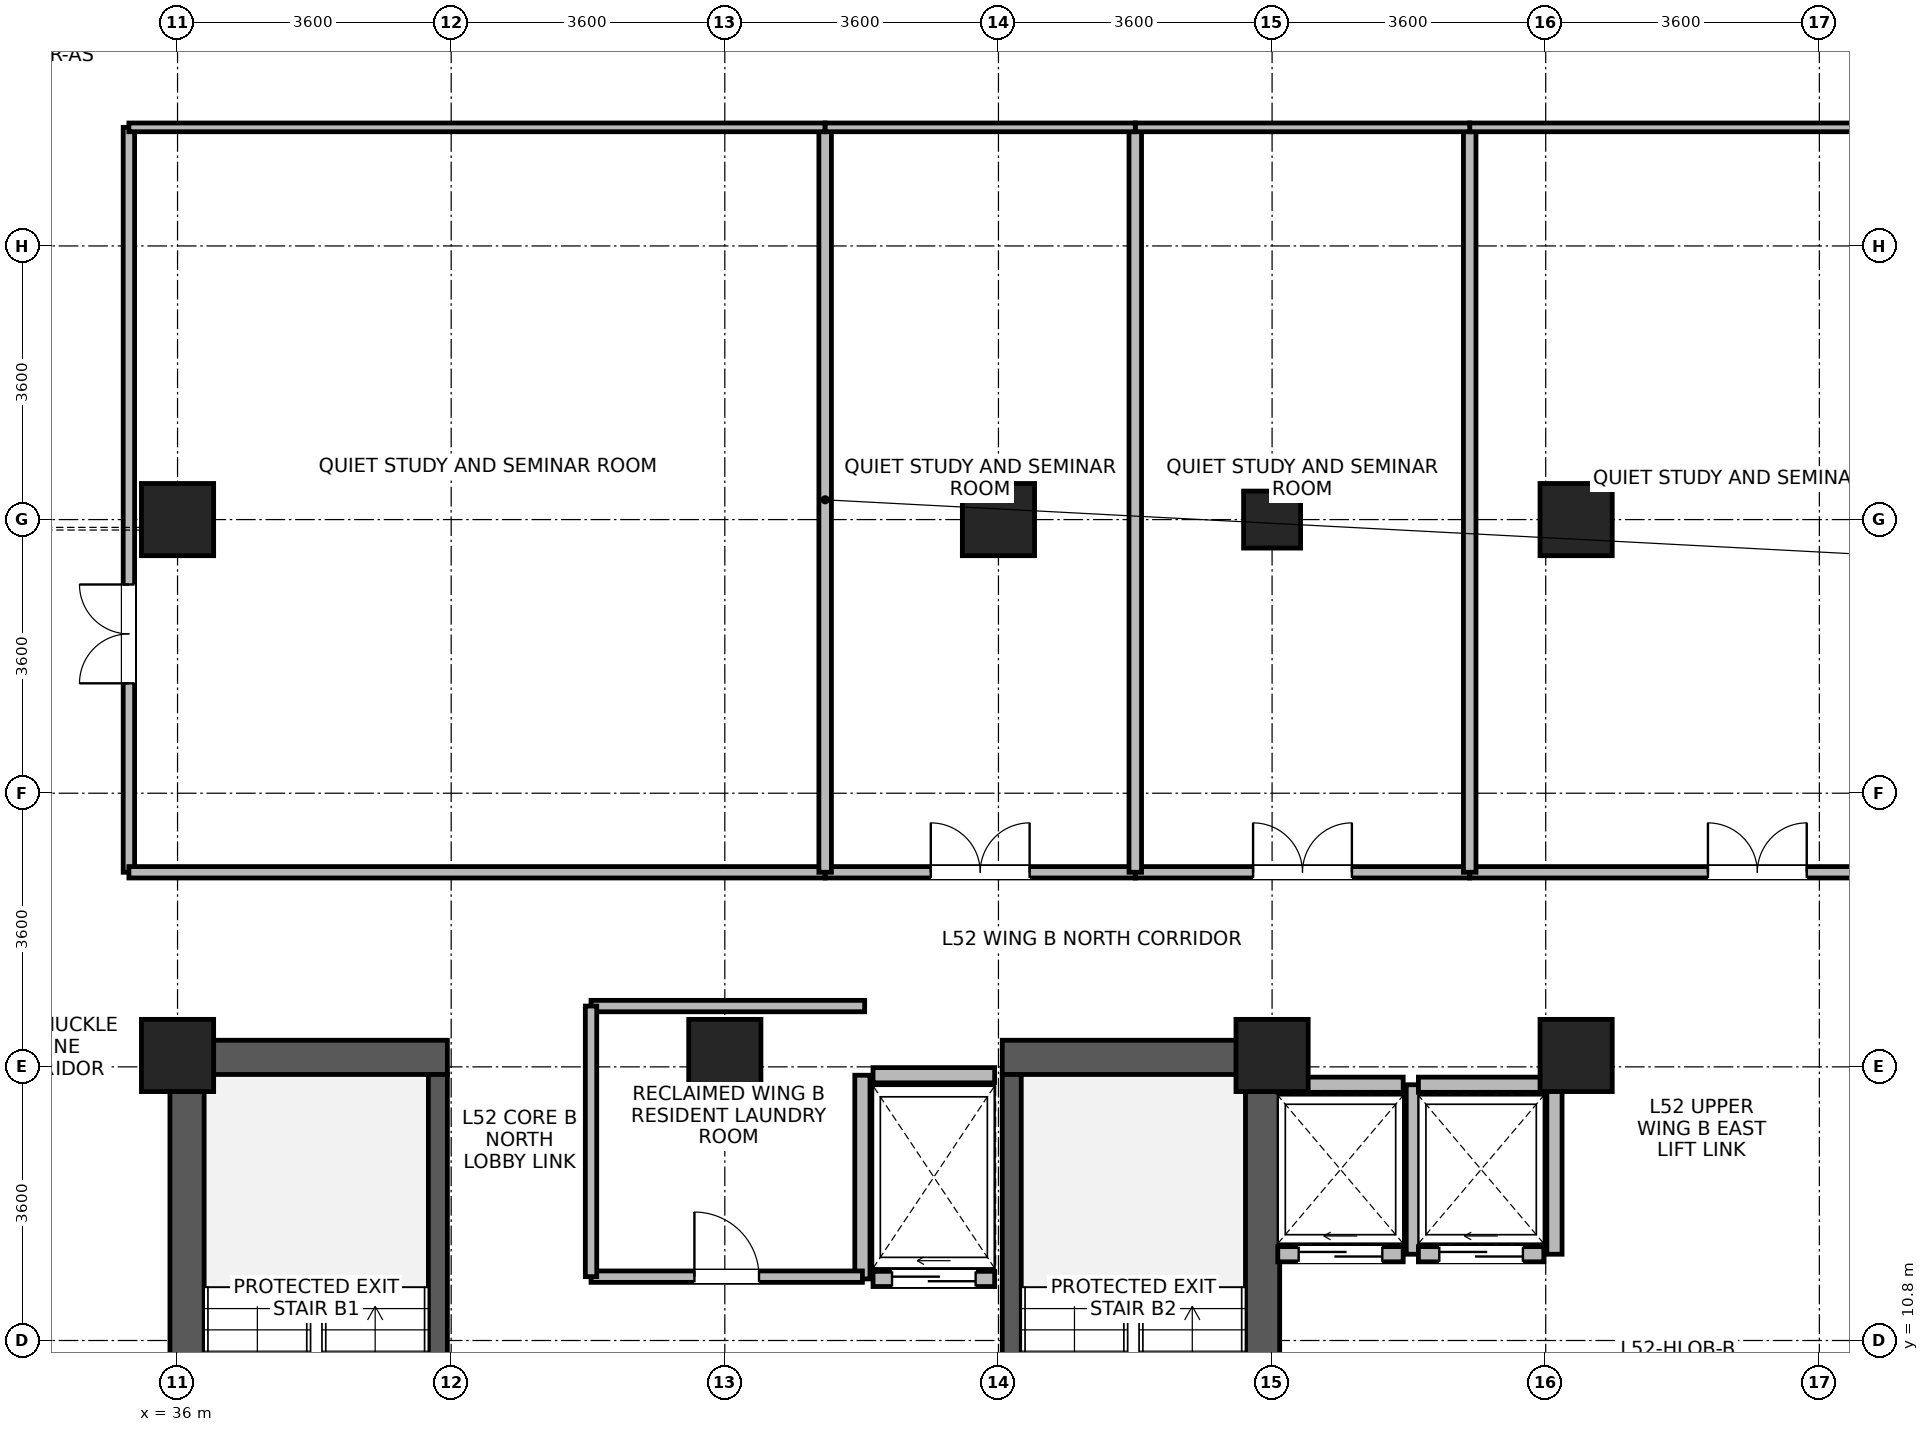
"""IFC4 building model, lengths in metres.
Left out: names, types, materials, properties, quantities, classifications, styles, units other than length and angle.
Written with IfcOpenShell. Run it as: python <this file> out.ifc"""

import sys

from ifc_helpers import new_model, si_unit, direction, frame, frame_2d, origin, origin_2d, place, context, subcontext, project, spatial, rectangle, extrude, source, transform, mapped, element, fill, save


model = new_model("IFC4")
c1 = context("Model", 3, precision=1e-05, world=origin(), true_north=direction((0.0, 1.0)))
c2 = subcontext(c1, "Body", "Model", "MODEL_VIEW")
j1 = project(units=[si_unit("LENGTHUNIT", "METRE"), si_unit("PLANEANGLEUNIT", "RADIAN")], contexts=[c1])
p1 = place(None, origin())
s1 = spatial("IfcSite", under=j1, at=p1, CompositionType="ELEMENT")
p2 = place(p1, origin())
s2 = spatial("IfcBuilding", under=s1, at=p2, CompositionType="ELEMENT")
p3 = place(p2, frame((0.0, 0.0, 205.5)))
s3 = spatial("IfcBuildingStorey", under=s2, at=p3, CompositionType="ELEMENT", Elevation=205.5)
for number, where, z_axis, x_axis in (
    (1, (36.125, 6.85, 0.0), (0.0, 0.0, 1.0), (0.0, 1.0, 0.0)),
    (2, (50.275, 6.85, 0.0), (0.0, 0.0, 1.0), (0.0, 1.0, 0.0)),
):
    element("IfcWall", number, at=place(p3, frame(where, z_axis=z_axis, x_axis=x_axis)), inside=s3, PredefinedType="SHEAR", context=c2, shape_type="SweptSolid", body=[
        extrude(rectangle(XDim=7.9, YDim=0.45, at=frame_2d((3.95, 0.0))), origin(), (0.0, 0.0, 1.0), 3.47),
    ])
for number, where, z_axis, x_axis in (
    (3, (36.35, 14.525, 0.0), (0.0, 0.0, 1.0), (1.0, 0.0, 0.0)),
    (4, (46.85, 14.525, 0.0), (0.0, 0.0, 1.0), (1.0, 0.0, 0.0)),
):
    element("IfcWall", number, at=place(p3, frame(where, z_axis=z_axis, x_axis=x_axis)), inside=s3, PredefinedType="SHEAR", context=c2, shape_type="SweptSolid", body=[
        extrude(rectangle(XDim=3.2, YDim=0.45, at=frame_2d((1.6, 0.0))), origin(), (0.0, 0.0, 1.0), 3.47),
    ])
p4 = place(p3, frame((39.425, 7.3, 0.0), z_axis=(0.0, 0.0, 1.0), x_axis=(0.0, 1.0, 0.0)))
e5 = element("IfcWall", 5, at=p4, inside=s3, PredefinedType="SHEAR", context=c2, shape_type="SweptSolid", body=[
    extrude(rectangle(XDim=7.0, YDim=0.25, at=frame_2d((3.5, 0.0))), origin(), (0.0, 0.0, 1.0), 3.47),
])
p5 = place(p4, frame((0.15, 0.0, 0.0)))
e6 = element("IfcOpeningElement", 6, at=p5, cuts=e5, PredefinedType="OPENING", context=c2, shape_type="SweptSolid", body=[
    extrude(rectangle(XDim=1.1, YDim=2.08, at=frame_2d((0.55, 1.04))), frame((0.0, 0.135, 0.0), z_axis=(0.0, -1.0, 0.0), x_axis=(1.0, 0.0, 0.0)), (0.0, 0.0, 1.0), 0.27),
])
p6 = place(p3, frame((46.975, 7.3, 0.0), z_axis=(0.0, 0.0, 1.0), x_axis=(0.0, 1.0, 0.0)))
e7 = element("IfcWall", 7, at=p6, inside=s3, PredefinedType="SHEAR", context=c2, shape_type="SweptSolid", body=[
    extrude(rectangle(XDim=7.0, YDim=0.25, at=frame_2d((3.5, 0.0))), origin(), (0.0, 0.0, 1.0), 3.47),
])
p7 = place(p6, frame((0.15, 0.0, 0.0)))
e8 = element("IfcOpeningElement", 8, at=p7, cuts=e7, PredefinedType="OPENING", context=c2, shape_type="SweptSolid", body=[
    extrude(rectangle(XDim=1.1, YDim=2.08, at=frame_2d((0.55, 1.04))), frame((0.0, 0.135, 0.0), z_axis=(0.0, -1.0, 0.0), x_axis=(1.0, 0.0, 0.0)), (0.0, 0.0, 1.0), 0.27),
])
m1 = source(origin(), c2, "Body", "SweptSolid", [
    extrude(rectangle(XDim=0.95, YDim=0.95, at=origin_2d()), origin(), (0.0, 0.0, 1.0), 3.7),
])
for number, where, z_axis, x_axis in (
    (9, (36.0, 21.6, 0.0), (0.0, 0.0, 1.0), (1.0, 0.0, 0.0)),
    (10, (46.8, 21.6, 0.0), (0.0, 0.0, 1.0), (1.0, 0.0, 0.0)),
    (11, (36.0, 14.55, 0.0), (0.0, 0.0, 1.0), (1.0, 0.0, 0.0)),
    (12, (43.2, 14.55, 0.0), (0.0, 0.0, 1.0), (1.0, 0.0, 0.0)),
    (13, (50.4, 14.55, 0.0), (0.0, 0.0, 1.0), (1.0, 0.0, 0.0)),
):
    element("IfcColumn", number, at=place(p3, frame(where, z_axis=z_axis, x_axis=x_axis)), inside=s3, PredefinedType="COLUMN", context=c2, shape_type="MappedRepresentation", body=[
        mapped(m1, transform((0.0, 0.0, 0.0), x_axis=(1.0, 0.0, 0.0), y_axis=(0.0, 1.0, 0.0), z_axis=(0.0, 0.0, 1.0), scale=1.0)),
    ])
m2 = source(origin(), c2, "Body", "SweptSolid", [
    extrude(rectangle(XDim=0.75, YDim=0.75, at=origin_2d()), origin(), (0.0, 0.0, 1.0), 3.7),
])
p8 = place(p3, frame((50.4, 21.6, 0.0), z_axis=(0.0, 0.0, 1.0), x_axis=(1.0, 0.0, 0.0)))
e14 = element("IfcColumn", 14, at=p8, inside=s3, PredefinedType="PILASTER", context=c2, shape_type="MappedRepresentation", body=[
    mapped(m2, transform((0.0, 0.0, 0.0), x_axis=(1.0, 0.0, 0.0), y_axis=(0.0, 1.0, 0.0), z_axis=(0.0, 0.0, 1.0), scale=1.0)),
])
for number, where, z_axis, x_axis in (
    (15, (54.4, 14.55, 0.0), (0.0, 0.0, 1.0), (1.0, 0.0, 0.0)),
    (16, (54.4, 21.6, 0.0), (0.0, 0.0, 1.0), (1.0, 0.0, 0.0)),
):
    element("IfcColumn", number, at=place(p3, frame(where, z_axis=z_axis, x_axis=x_axis)), inside=s3, PredefinedType="COLUMN", context=c2, shape_type="MappedRepresentation", body=[
        mapped(m1, transform((0.0, 0.0, 0.0), x_axis=(1.0, 0.0, 0.0), y_axis=(0.0, 1.0, 0.0), z_axis=(0.0, 0.0, 1.0), scale=1.0)),
    ])
p9 = place(p3, frame((50.475, 11.935, 0.0), z_axis=(0.0, 0.0, 1.0), x_axis=(1.0, 0.0, 0.0)))
e17 = element("IfcWall", 17, at=p9, inside=s3, PredefinedType="PARTITIONING", context=c2, shape_type="SweptSolid", body=[
    extrude(rectangle(XDim=1.65, YDim=0.2, at=frame_2d((0.825, 0.0))), origin(), (0.0, 0.0, 1.0), 3.45),
])
p10 = place(p9, frame((0.275, 0.0, 0.0)))
e18 = element("IfcOpeningElement", 18, at=p10, cuts=e17, PredefinedType="OPENING", context=c2, shape_type="SweptSolid", body=[
    extrude(rectangle(XDim=1.1, YDim=2.12, at=frame_2d((0.55, 1.06))), frame((0.0, 0.11, 0.0), z_axis=(0.0, -1.0, 0.0), x_axis=(1.0, 0.0, 0.0)), (0.0, 0.0, 1.0), 0.22),
])
p11 = place(p3, frame((50.475, 14.165, 0.0), z_axis=(0.0, 0.0, 1.0), x_axis=(1.0, 0.0, 0.0)))
e19 = element("IfcWall", 19, at=p11, inside=s3, PredefinedType="PARTITIONING", context=c2, shape_type="SweptSolid", body=[
    extrude(rectangle(XDim=1.65, YDim=0.2, at=frame_2d((0.825, 0.0))), origin(), (0.0, 0.0, 1.0), 3.45),
])
p12 = place(p3, frame((52.265, 11.935, 0.0), z_axis=(0.0, 0.0, 1.0), x_axis=(0.0, 1.0, 0.0)))
e20 = element("IfcWall", 20, at=p12, inside=s3, PredefinedType="PARTITIONING", context=c2, shape_type="SweptSolid", body=[
    extrude(rectangle(XDim=2.23, YDim=0.2, at=frame_2d((1.115, 0.0))), origin(), (0.0, 0.0, 1.0), 3.45),
])
p13 = place(p3, frame((52.325, 11.935, 0.0), z_axis=(0.0, 0.0, 1.0), x_axis=(1.0, 0.0, 0.0)))
e21 = element("IfcWall", 21, at=p13, inside=s3, PredefinedType="PARTITIONING", context=c2, shape_type="SweptSolid", body=[
    extrude(rectangle(XDim=1.65, YDim=0.2, at=frame_2d((0.825, 0.0))), origin(), (0.0, 0.0, 1.0), 3.45),
])
p14 = place(p13, frame((0.275, 0.0, 0.0)))
e22 = element("IfcOpeningElement", 22, at=p14, cuts=e21, PredefinedType="OPENING", context=c2, shape_type="SweptSolid", body=[
    extrude(rectangle(XDim=1.1, YDim=2.12, at=frame_2d((0.55, 1.06))), frame((0.0, 0.11, 0.0), z_axis=(0.0, -1.0, 0.0), x_axis=(1.0, 0.0, 0.0)), (0.0, 0.0, 1.0), 0.22),
])
p15 = place(p3, frame((52.325, 14.165, 0.0), z_axis=(0.0, 0.0, 1.0), x_axis=(1.0, 0.0, 0.0)))
e23 = element("IfcWall", 23, at=p15, inside=s3, PredefinedType="PARTITIONING", context=c2, shape_type="SweptSolid", body=[
    extrude(rectangle(XDim=1.65, YDim=0.2, at=frame_2d((0.825, 0.0))), origin(), (0.0, 0.0, 1.0), 3.45),
])
p16 = place(p3, frame((54.115, 11.935, 0.0), z_axis=(0.0, 0.0, 1.0), x_axis=(0.0, 1.0, 0.0)))
e24 = element("IfcWall", 24, at=p16, inside=s3, PredefinedType="PARTITIONING", context=c2, shape_type="SweptSolid", body=[
    extrude(rectangle(XDim=2.23, YDim=0.2, at=frame_2d((1.115, 0.0))), origin(), (0.0, 0.0, 1.0), 3.45),
])
p17 = place(p3, frame((45.15, 11.61, 0.0), z_axis=(0.0, 0.0, 1.0), x_axis=(1.0, 0.0, 0.0)))
e25 = element("IfcWall", 25, at=p17, inside=s3, PredefinedType="PARTITIONING", context=c2, shape_type="SweptSolid", body=[
    extrude(rectangle(XDim=1.6, YDim=0.2, at=frame_2d((0.8, 0.0))), origin(), (0.0, 0.0, 1.0), 3.45),
])
p18 = place(p17, frame((0.25, 0.0, 0.0)))
e26 = element("IfcOpeningElement", 26, at=p18, cuts=e25, PredefinedType="OPENING", context=c2, shape_type="SweptSolid", body=[
    extrude(rectangle(XDim=1.1, YDim=2.12, at=frame_2d((0.55, 1.06))), frame((0.0, 0.11, 0.0), z_axis=(0.0, -1.0, 0.0), x_axis=(1.0, 0.0, 0.0)), (0.0, 0.0, 1.0), 0.22),
])
p19 = place(p3, frame((45.15, 14.29, 0.0), z_axis=(0.0, 0.0, 1.0), x_axis=(1.0, 0.0, 0.0)))
e27 = element("IfcWall", 27, at=p19, inside=s3, PredefinedType="PARTITIONING", context=c2, shape_type="SweptSolid", body=[
    extrude(rectangle(XDim=1.6, YDim=0.2, at=frame_2d((0.8, 0.0))), origin(), (0.0, 0.0, 1.0), 2.45),
])
p20 = place(p3, frame((45.01, 11.61, 0.0), z_axis=(0.0, 0.0, 1.0), x_axis=(0.0, 1.0, 0.0)))
e28 = element("IfcWall", 28, at=p20, inside=s3, PredefinedType="PARTITIONING", context=c2, shape_type="SweptSolid", body=[
    extrude(rectangle(XDim=2.68, YDim=0.2, at=frame_2d((1.34, 0.0))), origin(), (0.0, 0.0, 1.0), 3.45),
])
p21 = place(p3, frame((35.36, 16.96, 0.0), z_axis=(0.0, 0.0, 1.0), x_axis=(0.0, 1.0, 0.0)))
e29 = element("IfcWall", 29, at=p21, inside=s3, PredefinedType="PARTITIONING", context=c2, shape_type="SweptSolid", body=[
    extrude(rectangle(XDim=9.8, YDim=0.15, at=frame_2d((4.9, 0.0))), origin(), (0.0, 0.0, 1.0), 3.45),
])
p22 = place(p21, frame((2.486, 0.0, 0.0)))
e30 = element("IfcOpeningElement", 30, at=p22, cuts=e29, PredefinedType="OPENING", context=c2, shape_type="SweptSolid", body=[
    extrude(rectangle(XDim=1.3, YDim=2.12, at=frame_2d((0.65, 1.06))), frame((0.0, 0.085, 0.0), z_axis=(0.0, -1.0, 0.0), x_axis=(1.0, 0.0, 0.0)), (0.0, 0.0, 1.0), 0.17),
])
p23 = place(p3, frame((35.36, 16.96, 0.0), z_axis=(0.0, 0.0, 1.0), x_axis=(1.0, 0.0, 0.0)))
e31 = element("IfcWall", 31, at=p23, inside=s3, PredefinedType="PARTITIONING", context=c2, shape_type="SweptSolid", body=[
    extrude(rectangle(XDim=9.16, YDim=0.15, at=frame_2d((4.58, 0.0))), origin(), (0.0, 0.0, 1.0), 3.45),
])
p24 = place(p3, frame((53.0, 16.96, 0.0), z_axis=(0.0, 0.0, 1.0), x_axis=(1.0, 0.0, 0.0)))
e32 = element("IfcWall", 32, at=p24, inside=s3, PredefinedType="PARTITIONING", context=c2, shape_type="SweptSolid", body=[
    extrude(rectangle(XDim=7.568, YDim=0.15, at=frame_2d((3.784, 0.0))), origin(), (0.0, 0.0, 1.0), 3.45),
])
p25 = place(p24, frame((3.134, 0.0, 0.0)))
e33 = element("IfcOpeningElement", 33, at=p25, cuts=e32, PredefinedType="OPENING", context=c2, shape_type="SweptSolid", body=[
    extrude(rectangle(XDim=1.3, YDim=2.12, at=frame_2d((0.65, 1.06))), frame((0.0, 0.085, 0.0), z_axis=(0.0, -1.0, 0.0), x_axis=(1.0, 0.0, 0.0)), (0.0, 0.0, 1.0), 0.17),
])
p26 = place(p3, frame((48.6, 16.96, 0.0), z_axis=(0.0, 0.0, 1.0), x_axis=(1.0, 0.0, 0.0)))
e34 = element("IfcWall", 34, at=p26, inside=s3, PredefinedType="PARTITIONING", context=c2, shape_type="SweptSolid", body=[
    extrude(rectangle(XDim=4.4, YDim=0.15, at=frame_2d((2.2, 0.0))), origin(), (0.0, 0.0, 1.0), 3.45),
])
p27 = place(p26, frame((1.55, 0.0, 0.0)))
e35 = element("IfcOpeningElement", 35, at=p27, cuts=e34, PredefinedType="OPENING", context=c2, shape_type="SweptSolid", body=[
    extrude(rectangle(XDim=1.3, YDim=2.12, at=frame_2d((0.65, 1.06))), frame((0.0, 0.085, 0.0), z_axis=(0.0, -1.0, 0.0), x_axis=(1.0, 0.0, 0.0)), (0.0, 0.0, 1.0), 0.17),
])
p28 = place(p3, frame((44.52, 16.96, 0.0), z_axis=(0.0, 0.0, 1.0), x_axis=(1.0, 0.0, 0.0)))
e36 = element("IfcWall", 36, at=p28, inside=s3, PredefinedType="PARTITIONING", context=c2, shape_type="SweptSolid", body=[
    extrude(rectangle(XDim=4.08, YDim=0.15, at=frame_2d((2.04, 0.0))), origin(), (0.0, 0.0, 1.0), 3.45),
])
p29 = place(p28, frame((1.39, 0.0, 0.0)))
e37 = element("IfcOpeningElement", 37, at=p29, cuts=e36, PredefinedType="OPENING", context=c2, shape_type="SweptSolid", body=[
    extrude(rectangle(XDim=1.3, YDim=2.12, at=frame_2d((0.65, 1.06))), frame((0.0, 0.085, 0.0), z_axis=(0.0, -1.0, 0.0), x_axis=(1.0, 0.0, 0.0)), (0.0, 0.0, 1.0), 0.17),
])
p30 = place(p3, frame((41.44, 11.64, 0.0), z_axis=(0.0, 0.0, 1.0), x_axis=(1.0, 0.0, 0.0)))
e38 = element("IfcWall", 38, at=p30, inside=s3, PredefinedType="PARTITIONING", context=c2, shape_type="SweptSolid", body=[
    extrude(rectangle(XDim=3.57, YDim=0.15, at=frame_2d((1.785, 0.0))), origin(), (0.0, 0.0, 1.0), 3.45),
])
p31 = place(p30, frame((1.36, 0.0, 0.0)))
e39 = element("IfcOpeningElement", 39, at=p31, cuts=e38, PredefinedType="OPENING", context=c2, shape_type="SweptSolid", body=[
    extrude(rectangle(XDim=0.85, YDim=2.04, at=frame_2d((0.425, 1.02))), frame((0.0, 0.085, 0.0), z_axis=(0.0, -1.0, 0.0), x_axis=(1.0, 0.0, 0.0)), (0.0, 0.0, 1.0), 0.17),
])
p32 = place(p3, frame((41.44, 15.2, 0.0), z_axis=(0.0, 0.0, 1.0), x_axis=(1.0, 0.0, 0.0)))
e40 = element("IfcWall", 40, at=p32, inside=s3, PredefinedType="PARTITIONING", context=c2, shape_type="SweptSolid", body=[
    extrude(rectangle(XDim=3.6, YDim=0.15, at=frame_2d((1.8, 0.0))), origin(), (0.0, 0.0, 1.0), 3.45),
])
p33 = place(p3, frame((41.44, 11.64, 0.0), z_axis=(0.0, 0.0, 1.0), x_axis=(0.0, 1.0, 0.0)))
e41 = element("IfcWall", 41, at=p33, inside=s3, PredefinedType="PARTITIONING", context=c2, shape_type="SweptSolid", body=[
    extrude(rectangle(XDim=3.56, YDim=0.15, at=frame_2d((1.78, 0.0))), origin(), (0.0, 0.0, 1.0), 3.45),
])
for number, where, z_axis, x_axis in (
    (42, (44.52, 16.96, 0.0), (0.0, 0.0, 1.0), (0.0, 1.0, 0.0)),
    (43, (48.6, 16.96, 0.0), (0.0, 0.0, 1.0), (0.0, 1.0, 0.0)),
    (44, (53.0, 16.96, 0.0), (0.0, 0.0, 1.0), (0.0, 1.0, 0.0)),
):
    element("IfcWall", number, at=place(p3, frame(where, z_axis=z_axis, x_axis=x_axis)), inside=s3, PredefinedType="PARTITIONING", context=c2, shape_type="SweptSolid", body=[
        extrude(rectangle(XDim=9.8, YDim=0.165, at=frame_2d((4.9, 0.0))), origin(), (0.0, 0.0, 1.0), 3.45),
    ])
p34 = place(p3, frame((35.36, 26.76, 0.0), z_axis=(0.0, 0.0, 1.0), x_axis=(1.0, 0.0, 0.0)))
e45 = element("IfcWall", 45, at=p34, inside=s3, PredefinedType="PARTITIONING", context=c2, shape_type="SweptSolid", body=[
    extrude(rectangle(XDim=9.16, YDim=0.115, at=frame_2d((4.58, 0.0))), origin(), (0.0, 0.0, 1.0), 3.45),
])
p35 = place(p3, frame((53.0, 26.76, 0.0), z_axis=(0.0, 0.0, 1.0), x_axis=(1.0, 0.0, 0.0)))
e46 = element("IfcWall", 46, at=p35, inside=s3, PredefinedType="PARTITIONING", context=c2, shape_type="SweptSolid", body=[
    extrude(rectangle(XDim=7.568, YDim=0.115, at=frame_2d((3.784, 0.0))), origin(), (0.0, 0.0, 1.0), 3.45),
])
p36 = place(p3, frame((48.6, 26.76, 0.0), z_axis=(0.0, 0.0, 1.0), x_axis=(1.0, 0.0, 0.0)))
e47 = element("IfcWall", 47, at=p36, inside=s3, PredefinedType="PARTITIONING", context=c2, shape_type="SweptSolid", body=[
    extrude(rectangle(XDim=4.4, YDim=0.115, at=frame_2d((2.2, 0.0))), origin(), (0.0, 0.0, 1.0), 3.45),
])
p37 = place(p3, frame((44.52, 26.76, 0.0), z_axis=(0.0, 0.0, 1.0), x_axis=(1.0, 0.0, 0.0)))
e48 = element("IfcWall", 48, at=p37, inside=s3, PredefinedType="PARTITIONING", context=c2, shape_type="SweptSolid", body=[
    extrude(rectangle(XDim=4.08, YDim=0.115, at=frame_2d((2.04, 0.0))), origin(), (0.0, 0.0, 1.0), 3.45),
])
p38 = place(p10, origin())
e49 = element("IfcDoor", 49, at=p38, inside=s3, OperationType="SLIDING_TO_LEFT", PredefinedType="DOOR", context=c2, shape_type="SweptSolid", body=[
    extrude(rectangle(XDim=1.1, YDim=2.12, at=frame_2d((0.55, 1.06))), frame((0.0, 0.025, 0.0), z_axis=(0.0, -1.0, 0.0), x_axis=(1.0, 0.0, 0.0)), (0.0, 0.0, 1.0), 0.05),
])
fill(e18, e49)
p39 = place(p14, origin())
e50 = element("IfcDoor", 50, at=p39, inside=s3, OperationType="SLIDING_TO_LEFT", PredefinedType="DOOR", context=c2, shape_type="SweptSolid", body=[
    extrude(rectangle(XDim=1.1, YDim=2.12, at=frame_2d((0.55, 1.06))), frame((0.0, 0.025, 0.0), z_axis=(0.0, -1.0, 0.0), x_axis=(1.0, 0.0, 0.0)), (0.0, 0.0, 1.0), 0.05),
])
fill(e22, e50)
p40 = place(p18, origin())
e51 = element("IfcDoor", 51, at=p40, inside=s3, OperationType="SLIDING_TO_LEFT", PredefinedType="DOOR", context=c2, shape_type="SweptSolid", body=[
    extrude(rectangle(XDim=1.1, YDim=2.12, at=frame_2d((0.55, 1.06))), frame((0.0, 0.025, 0.0), z_axis=(0.0, -1.0, 0.0), x_axis=(1.0, 0.0, 0.0)), (0.0, 0.0, 1.0), 0.05),
])
fill(e26, e51)
p41 = place(p22, origin())
e52 = element("IfcDoor", 52, at=p41, inside=s3, OperationType="DOUBLE_DOOR_SINGLE_SWING", PredefinedType="DOOR", context=c2, shape_type="SweptSolid", body=[
    extrude(rectangle(XDim=1.3, YDim=2.12, at=frame_2d((0.65, 1.06))), frame((0.0, 0.025, 0.0), z_axis=(0.0, -1.0, 0.0), x_axis=(1.0, 0.0, 0.0)), (0.0, 0.0, 1.0), 0.05),
])
fill(e30, e52)
p42 = place(p25, origin())
e53 = element("IfcDoor", 53, at=p42, inside=s3, OperationType="DOUBLE_DOOR_SINGLE_SWING", PredefinedType="DOOR", context=c2, shape_type="SweptSolid", body=[
    extrude(rectangle(XDim=1.3, YDim=2.12, at=frame_2d((0.65, 1.06))), frame((0.0, 0.025, 0.0), z_axis=(0.0, -1.0, 0.0), x_axis=(1.0, 0.0, 0.0)), (0.0, 0.0, 1.0), 0.05),
])
fill(e33, e53)
p43 = place(p27, origin())
e54 = element("IfcDoor", 54, at=p43, inside=s3, OperationType="DOUBLE_DOOR_SINGLE_SWING", PredefinedType="DOOR", context=c2, shape_type="SweptSolid", body=[
    extrude(rectangle(XDim=1.3, YDim=2.12, at=frame_2d((0.65, 1.06))), frame((0.0, 0.025, 0.0), z_axis=(0.0, -1.0, 0.0), x_axis=(1.0, 0.0, 0.0)), (0.0, 0.0, 1.0), 0.05),
])
fill(e35, e54)
p44 = place(p29, origin())
e55 = element("IfcDoor", 55, at=p44, inside=s3, OperationType="DOUBLE_DOOR_SINGLE_SWING", PredefinedType="DOOR", context=c2, shape_type="SweptSolid", body=[
    extrude(rectangle(XDim=1.3, YDim=2.12, at=frame_2d((0.65, 1.06))), frame((0.0, 0.025, 0.0), z_axis=(0.0, -1.0, 0.0), x_axis=(1.0, 0.0, 0.0)), (0.0, 0.0, 1.0), 0.05),
])
fill(e37, e55)
p45 = place(p31, origin())
e56 = element("IfcDoor", 56, at=p45, inside=s3, OperationType="SINGLE_SWING_LEFT", PredefinedType="DOOR", context=c2, shape_type="SweptSolid", body=[
    extrude(rectangle(XDim=0.85, YDim=2.04, at=frame_2d((0.425, 1.02))), frame((0.0, 0.025, 0.0), z_axis=(0.0, -1.0, 0.0), x_axis=(1.0, 0.0, 0.0)), (0.0, 0.0, 1.0), 0.05),
])
fill(e39, e56)
save(model, sys.argv[1])
